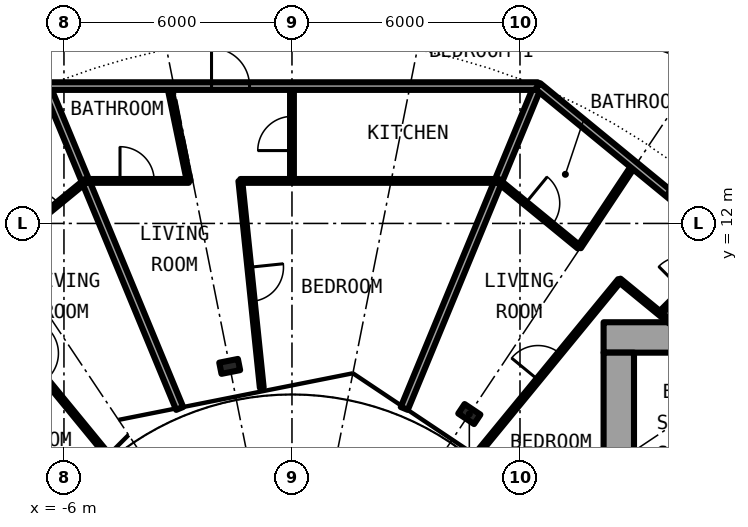
"""IFC4 building model, lengths in metres.
Left out: names, types, materials, properties, quantities, classifications, styles, units other than length and angle.
Written with IfcOpenShell. Run it as: python <this file> out.ifc"""

import sys

from ifc_helpers import new_model, si_unit, direction, frame, frame_2d, origin, origin_2d, place, context, subcontext, project, spatial, rectangle, i_section, extrude, element, fill, save


model = new_model("IFC4")
c1 = context("Model", 3, precision=1e-05, world=origin(), true_north=direction((0.0, 1.0)))
c2 = subcontext(c1, "Body", "Model", "MODEL_VIEW")
j1 = project(units=[si_unit("LENGTHUNIT", "METRE"), si_unit("PLANEANGLEUNIT", "RADIAN")], contexts=[c1])
p1 = place(None, origin())
s1 = spatial("IfcSite", under=j1, at=p1, CompositionType="ELEMENT")
p2 = place(p1, origin())
s2 = spatial("IfcBuilding", under=s1, at=p2, CompositionType="ELEMENT")
p3 = place(p2, frame((0.0, 0.0, 35.0)))
s3 = spatial("IfcBuildingStorey", under=s2, at=p3, CompositionType="ELEMENT", Elevation=35.0)
for number, where, z_axis, x_axis in (
    (1, (4.667, 6.984, 0.0), (0.0, 0.0, 1.0), (0.556, 0.831, 0.0)),
    (2, (-1.639, 8.239, 0.0), (0.0, 0.0, 1.0), (-0.195, 0.981, 0.0)),
):
    element("IfcColumn", number, at=place(p3, frame(where, z_axis=z_axis, x_axis=x_axis)), inside=s3, PredefinedType="COLUMN", context=c2, shape_type="SweptSolid", body=[
        extrude(i_section(OverallWidth=0.3, OverallDepth=0.5, WebThickness=0.014, FlangeThickness=0.028, FilletRadius=0.027, at=origin_2d()), origin(), (0.0, 0.0, 1.0), 3.05),
    ])
p4 = place(p3, frame((22.4, 9.0, 0.0), z_axis=(0.0, 0.0, 1.0), x_axis=(-1.0, 0.0, 0.0)))
e3 = element("IfcWall", 3, at=p4, inside=s3, PredefinedType="SHEAR", context=c2, shape_type="SweptSolid", body=[
    extrude(rectangle(XDim=14.2, YDim=0.8, at=frame_2d((7.1, 0.0))), origin(), (0.0, 0.0, 1.0), 3.05),
])
p5 = place(p4, frame((1.325, 0.0, 0.0)))
e4 = element("IfcOpeningElement", 4, at=p5, cuts=e3, PredefinedType="OPENING", context=c2, shape_type="SweptSolid", body=[
    extrude(rectangle(XDim=1.2, YDim=2.3, at=frame_2d((0.6, 1.15))), frame((0.0, 0.41, 0.0), z_axis=(0.0, -1.0, 0.0), x_axis=(1.0, 0.0, 0.0)), (0.0, 0.0, 1.0), 0.82),
])
p6 = place(p3, frame((8.6, -8.6, 0.0), z_axis=(0.0, 0.0, 1.0), x_axis=(0.0, 1.0, 0.0)))
e5 = element("IfcWall", 5, at=p6, inside=s3, PredefinedType="SHEAR", context=c2, shape_type="SweptSolid", body=[
    extrude(rectangle(XDim=17.2, YDim=0.8, at=frame_2d((8.6, 0.0))), origin(), (0.0, 0.0, 1.0), 3.05),
])
p7 = place(p6, frame((7.4, 0.0, 0.1)))
e6 = element("IfcOpeningElement", 6, at=p7, cuts=e5, PredefinedType="OPENING", context=c2, shape_type="SweptSolid", body=[
    extrude(rectangle(XDim=2.4, YDim=2.2, at=frame_2d((1.2, 1.1))), frame((0.0, 0.41, 0.0), z_axis=(0.0, -1.0, 0.0), x_axis=(1.0, 0.0, 0.0)), (0.0, 0.0, 1.0), 0.82),
])
p8 = place(p3, frame((-8.621, 10.503, 0.0), z_axis=(0.0, 0.0, 1.0), x_axis=(0.634358693064, -0.773038840249, 0.0)))
e7 = element("IfcWall", 7, at=p8, inside=s3, PredefinedType="PARTITIONING", context=c2, shape_type="SweptSolid", body=[
    extrude(rectangle(XDim=5.868, YDim=0.1, at=frame_2d((2.934, 0.0))), origin(), (0.0, 0.0, 1.0), 2.7),
])
p9 = place(p8, frame((2.484, 0.0, 0.0)))
e8 = element("IfcOpeningElement", 8, at=p9, cuts=e7, PredefinedType="OPENING", context=c2, shape_type="SweptSolid", body=[
    extrude(rectangle(XDim=0.9, YDim=2.3, at=frame_2d((0.45, 1.15))), frame((0.0, 0.06, 0.0), z_axis=(0.0, -1.0, 0.0), x_axis=(1.0, 0.0, 0.0)), (0.0, 0.0, 1.0), 0.12),
])
p10 = place(p3, frame((-6.467, 15.614, 0.0), z_axis=(0.0, 0.0, 1.0), x_axis=(0.382556139466, -0.923932248683, 0.0)))
e9 = element("IfcWall", 9, at=p10, inside=s3, PredefinedType="PARTITIONING", context=c2, shape_type="SweptSolid", body=[
    extrude(rectangle(XDim=9.18, YDim=0.2, at=frame_2d((4.59, 0.0))), origin(), (0.0, 0.0, 1.0), 2.7),
])
p11 = place(p3, frame((-3.234, 15.614, 0.0), z_axis=(0.0, 0.0, 1.0), x_axis=(0.202836883315, -0.97921254014, 0.0)))
e10 = element("IfcWall", 10, at=p11, inside=s3, PredefinedType="PARTITIONING", context=c2, shape_type="SweptSolid", body=[
    extrude(rectangle(XDim=2.548, YDim=0.1, at=frame_2d((1.274, 0.0))), origin(), (0.0, 0.0, 1.0), 2.7),
])
p12 = place(p3, frame((-1.359, 13.119, 0.0), z_axis=(0.0, 0.0, 1.0), x_axis=(0.103118462411, -0.994669082012, 0.0)))
e11 = element("IfcWall", 11, at=p12, inside=s3, PredefinedType="PARTITIONING", context=c2, shape_type="SweptSolid", body=[
    extrude(rectangle(XDim=5.469, YDim=0.1, at=frame_2d((2.734, 0.0))), origin(), (0.0, 0.0, 1.0), 2.7),
])
p13 = place(p12, frame((2.285, 0.0, 0.0)))
e12 = element("IfcOpeningElement", 12, at=p13, cuts=e11, PredefinedType="OPENING", context=c2, shape_type="SweptSolid", body=[
    extrude(rectangle(XDim=0.9, YDim=2.3, at=frame_2d((0.45, 1.15))), frame((0.0, 0.06, 0.0), z_axis=(0.0, -1.0, 0.0), x_axis=(1.0, 0.0, 0.0)), (0.0, 0.0, 1.0), 0.12),
])
p14 = place(p3, frame((0.0, 13.119, 0.0), z_axis=(0.0, 0.0, 1.0), x_axis=(0.0, 1.0, 0.0)))
e13 = element("IfcWall", 13, at=p14, inside=s3, PredefinedType="PARTITIONING", context=c2, shape_type="SweptSolid", body=[
    extrude(rectangle(XDim=2.495, YDim=0.1, at=frame_2d((1.248, 0.0))), origin(), (0.0, 0.0, 1.0), 2.7),
])
p15 = place(p14, frame((0.798, 0.0, 0.0)))
e14 = element("IfcOpeningElement", 14, at=p15, cuts=e13, PredefinedType="OPENING", context=c2, shape_type="SweptSolid", body=[
    extrude(rectangle(XDim=0.9, YDim=2.3, at=frame_2d((0.45, 1.15))), frame((0.0, 0.06, 0.0), z_axis=(0.0, -1.0, 0.0), x_axis=(1.0, 0.0, 0.0)), (0.0, 0.0, 1.0), 0.12),
])
p16 = place(p3, frame((2.955, 7.132, 0.0), z_axis=(0.0, 0.0, 1.0), x_axis=(0.382556139466, 0.923932248683, 0.0)))
e15 = element("IfcWall", 15, at=p16, inside=s3, PredefinedType="PARTITIONING", context=c2, shape_type="SweptSolid", body=[
    extrude(rectangle(XDim=9.18, YDim=0.2, at=frame_2d((4.59, 0.0))), origin(), (0.0, 0.0, 1.0), 2.7),
])
p17 = place(p3, frame((4.899, 5.967, 0.0), z_axis=(0.0, 0.0, 1.0), x_axis=(0.634358693064, 0.773038840249, 0.0)))
e16 = element("IfcWall", 16, at=p17, inside=s3, PredefinedType="PARTITIONING", context=c2, shape_type="SweptSolid", body=[
    extrude(rectangle(XDim=5.868, YDim=0.1, at=frame_2d((2.934, 0.0))), origin(), (0.0, 0.0, 1.0), 2.7),
])
p18 = place(p17, frame((2.484, 0.0, 0.0)))
e17 = element("IfcOpeningElement", 17, at=p18, cuts=e16, PredefinedType="OPENING", context=c2, shape_type="SweptSolid", body=[
    extrude(rectangle(XDim=0.9, YDim=2.3, at=frame_2d((0.45, 1.15))), frame((0.0, 0.06, 0.0), z_axis=(0.0, -1.0, 0.0), x_axis=(1.0, 0.0, 0.0)), (0.0, 0.0, 1.0), 0.12),
])
p19 = place(p3, frame((7.56, 11.375, 0.0), z_axis=(0.0, 0.0, 1.0), x_axis=(0.553354377247, 0.83294593653, 0.0)))
e18 = element("IfcWall", 18, at=p19, inside=s3, PredefinedType="PARTITIONING", context=c2, shape_type="SweptSolid", body=[
    extrude(rectangle(XDim=2.597, YDim=0.1, at=frame_2d((1.298, 0.0))), origin(), (0.0, 0.0, 1.0), 2.7),
])
p20 = place(p3, frame((9.683, 9.632, 0.0), z_axis=(0.0, 0.0, 1.0), x_axis=(0.708796844581, 0.705412668665, 0.0)))
e19 = element("IfcWall", 19, at=p20, inside=s3, PredefinedType="PARTITIONING", context=c2, shape_type="SweptSolid", body=[
    extrude(rectangle(XDim=2.597, YDim=0.1, at=frame_2d((1.299, 0.0))), origin(), (0.0, 0.0, 1.0), 2.7),
])
p21 = place(p20, frame((0.849, 0.0, 0.0)))
e20 = element("IfcOpeningElement", 20, at=p21, cuts=e19, PredefinedType="OPENING", context=c2, shape_type="SweptSolid", body=[
    extrude(rectangle(XDim=0.9, YDim=2.3, at=frame_2d((0.45, 1.15))), frame((0.0, 0.06, 0.0), z_axis=(0.0, -1.0, 0.0), x_axis=(1.0, 0.0, 0.0)), (0.0, 0.0, 1.0), 0.12),
])
p22 = place(p3, frame((-5.434, 13.119, 0.0), z_axis=(0.0, 0.0, 1.0), x_axis=(1.0, 0.0, 0.0)))
e21 = element("IfcWall", 21, at=p22, inside=s3, PredefinedType="PARTITIONING", context=c2, shape_type="SweptSolid", body=[
    extrude(rectangle(XDim=2.717, YDim=0.1, at=frame_2d((1.358, 0.0))), origin(), (0.0, 0.0, 1.0), 2.7),
])
p23 = place(p22, frame((0.909, 0.0, 0.0)))
e22 = element("IfcOpeningElement", 22, at=p23, cuts=e21, PredefinedType="OPENING", context=c2, shape_type="SweptSolid", body=[
    extrude(rectangle(XDim=0.9, YDim=2.3, at=frame_2d((0.45, 1.15))), frame((0.0, 0.06, 0.0), z_axis=(0.0, -1.0, 0.0), x_axis=(1.0, 0.0, 0.0)), (0.0, 0.0, 1.0), 0.12),
])
p24 = place(p3, frame((-1.359, 13.119, 0.0), z_axis=(0.0, 0.0, 1.0), x_axis=(1.0, 0.0, 0.0)))
e23 = element("IfcWall", 23, at=p24, inside=s3, PredefinedType="PARTITIONING", context=c2, shape_type="SweptSolid", body=[
    extrude(rectangle(XDim=6.793, YDim=0.1, at=frame_2d((3.396, 0.0))), origin(), (0.0, 0.0, 1.0), 2.7),
])
p25 = place(p3, frame((-7.552, 11.379, 0.0), z_axis=(0.0, 0.0, 1.0), x_axis=(0.773323547924, 0.634011585246, 0.0)))
e24 = element("IfcWall", 24, at=p25, inside=s3, PredefinedType="PARTITIONING", context=c2, shape_type="SweptSolid", body=[
    extrude(rectangle(XDim=2.748, YDim=0.1, at=frame_2d((1.374, 0.0))), origin(), (0.0, 0.0, 1.0), 2.7),
])
p26 = place(p25, frame((0.917, 0.0, 0.0)))
e25 = element("IfcOpeningElement", 25, at=p26, cuts=e24, PredefinedType="OPENING", context=c2, shape_type="SweptSolid", body=[
    extrude(rectangle(XDim=0.9, YDim=2.3, at=frame_2d((0.45, 1.15))), frame((0.0, 0.06, 0.0), z_axis=(0.0, -1.0, 0.0), x_axis=(1.0, 0.0, 0.0)), (0.0, 0.0, 1.0), 0.12),
])
p27 = place(p3, frame((5.427, 13.121, 0.0), z_axis=(0.0, 0.0, 1.0), x_axis=(0.773323547924, -0.634011585246, 0.0)))
e26 = element("IfcWall", 26, at=p27, inside=s3, PredefinedType="PARTITIONING", context=c2, shape_type="SweptSolid", body=[
    extrude(rectangle(XDim=2.748, YDim=0.1, at=frame_2d((1.374, 0.0))), origin(), (0.0, 0.0, 1.0), 2.7),
])
p28 = place(p27, frame((0.93, 0.0, 0.0)))
e27 = element("IfcOpeningElement", 27, at=p28, cuts=e26, PredefinedType="OPENING", context=c2, shape_type="SweptSolid", body=[
    extrude(rectangle(XDim=0.9, YDim=2.3, at=frame_2d((0.45, 1.15))), frame((0.0, 0.06, 0.0), z_axis=(0.0, -1.0, 0.0), x_axis=(1.0, 0.0, 0.0)), (0.0, 0.0, 1.0), 0.12),
])
p29 = place(p3, frame((8.613, 10.509, 0.0), z_axis=(0.0, 0.0, 1.0), x_axis=(0.773141825369, -0.634233173104, 0.0)))
e28 = element("IfcWall", 28, at=p29, inside=s3, PredefinedType="PARTITIONING", context=c2, shape_type="SweptSolid", body=[
    extrude(rectangle(XDim=1.749, YDim=0.1, at=frame_2d((0.875, 0.0))), origin(), (0.0, 0.0, 1.0), 2.7),
])
p30 = place(p3, frame((-6.467, 15.614, 0.0), z_axis=(0.0, 0.0, 1.0), x_axis=(1.0, 0.0, 0.0)))
e29 = element("IfcWall", 29, at=p30, inside=s3, PredefinedType="PARTITIONING", context=c2, shape_type="SweptSolid", body=[
    extrude(rectangle(XDim=12.934, YDim=0.2, at=frame_2d((6.467, 0.0))), origin(), (0.0, 0.0, 1.0), 2.7),
])
p31 = place(p30, frame((4.35, 0.0, 0.0)))
e30 = element("IfcOpeningElement", 30, at=p31, cuts=e29, PredefinedType="OPENING", context=c2, shape_type="SweptSolid", body=[
    extrude(rectangle(XDim=1.0, YDim=2.3, at=frame_2d((0.5, 1.15))), frame((0.0, 0.11, 0.0), z_axis=(0.0, -1.0, 0.0), x_axis=(1.0, 0.0, 0.0)), (0.0, 0.0, 1.0), 0.22),
])
p32 = place(p3, frame((6.469, 15.613, 0.0), z_axis=(0.0, 0.0, 1.0), x_axis=(0.77298340166, -0.634426245326, 0.0)))
e31 = element("IfcWall", 31, at=p32, inside=s3, PredefinedType="PARTITIONING", context=c2, shape_type="SweptSolid", body=[
    extrude(rectangle(XDim=9.793, YDim=0.2, at=frame_2d((4.896, 0.0))), origin(), (0.0, 0.0, 1.0), 2.7),
])
p33 = place(p32, frame((4.404, 0.0, 0.0)))
e32 = element("IfcOpeningElement", 32, at=p33, cuts=e31, PredefinedType="OPENING", context=c2, shape_type="SweptSolid", body=[
    extrude(rectangle(XDim=1.0, YDim=2.3, at=frame_2d((0.5, 1.15))), frame((0.0, 0.11, 0.0), z_axis=(0.0, -1.0, 0.0), x_axis=(1.0, 0.0, 0.0)), (0.0, 0.0, 1.0), 0.22),
])
p34 = place(p3, frame((1.918, 19.506, 0.0), z_axis=(0.0, 0.0, 1.0), x_axis=(0.941574977747, -0.336803446065, 0.0)))
e33 = element("IfcWall", 33, at=p34, inside=s3, PredefinedType="PARTITIONING", context=c2, shape_type="SweptSolid", body=[
    extrude(rectangle(XDim=9.37, YDim=0.2, at=frame_2d((4.685, 0.0))), origin(), (0.0, 0.0, 1.0), 2.38),
])
p35 = place(p34, frame((3.313, 0.0, 0.0)))
e34 = element("IfcOpeningElement", 34, at=p35, cuts=e33, PredefinedType="OPENING", context=c2, shape_type="SweptSolid", body=[
    extrude(rectangle(XDim=1.0, YDim=2.3, at=frame_2d((0.5, 1.15))), frame((0.0, 0.11, 0.0), z_axis=(0.0, -1.0, 0.0), x_axis=(1.0, 0.0, 0.0)), (0.0, 0.0, 1.0), 0.22),
])
p36 = place(p33, origin())
e35 = element("IfcDoor", 35, at=p36, inside=s3, OperationType="SINGLE_SWING_RIGHT", PredefinedType="DOOR", context=c2, shape_type="SweptSolid", body=[
    extrude(rectangle(XDim=1.0, YDim=2.3, at=frame_2d((0.5, 1.15))), frame((0.0, 0.025, 0.0), z_axis=(0.0, -1.0, 0.0), x_axis=(1.0, 0.0, 0.0)), (0.0, 0.0, 1.0), 0.05),
])
fill(e32, e35)
p37 = place(p28, origin())
e36 = element("IfcDoor", 36, at=p37, inside=s3, OperationType="SINGLE_SWING_RIGHT", PredefinedType="DOOR", context=c2, shape_type="SweptSolid", body=[
    extrude(rectangle(XDim=0.9, YDim=2.3, at=frame_2d((0.45, 1.15))), frame((0.0, 0.025, 0.0), z_axis=(0.0, -1.0, 0.0), x_axis=(1.0, 0.0, 0.0)), (0.0, 0.0, 1.0), 0.05),
])
fill(e27, e36)
p38 = place(p18, origin())
e37 = element("IfcDoor", 37, at=p38, inside=s3, OperationType="SINGLE_SWING_RIGHT", PredefinedType="DOOR", context=c2, shape_type="SweptSolid", body=[
    extrude(rectangle(XDim=0.9, YDim=2.3, at=frame_2d((0.45, 1.15))), frame((0.0, 0.025, 0.0), z_axis=(0.0, -1.0, 0.0), x_axis=(1.0, 0.0, 0.0)), (0.0, 0.0, 1.0), 0.05),
])
fill(e17, e37)
p39 = place(p31, origin())
e38 = element("IfcDoor", 38, at=p39, inside=s3, OperationType="SINGLE_SWING_LEFT", PredefinedType="DOOR", context=c2, shape_type="SweptSolid", body=[
    extrude(rectangle(XDim=1.0, YDim=2.3, at=frame_2d((0.5, 1.15))), frame((0.0, 0.025, 0.0), z_axis=(0.0, -1.0, 0.0), x_axis=(1.0, 0.0, 0.0)), (0.0, 0.0, 1.0), 0.05),
])
fill(e30, e38)
p40 = place(p23, origin())
e39 = element("IfcDoor", 39, at=p40, inside=s3, OperationType="SINGLE_SWING_RIGHT", PredefinedType="DOOR", context=c2, shape_type="SweptSolid", body=[
    extrude(rectangle(XDim=0.9, YDim=2.3, at=frame_2d((0.45, 1.15))), frame((0.0, 0.025, 0.0), z_axis=(0.0, -1.0, 0.0), x_axis=(1.0, 0.0, 0.0)), (0.0, 0.0, 1.0), 0.05),
])
fill(e22, e39)
p41 = place(p15, origin())
e40 = element("IfcDoor", 40, at=p41, inside=s3, OperationType="SINGLE_SWING_RIGHT", PredefinedType="DOOR", context=c2, shape_type="SweptSolid", body=[
    extrude(rectangle(XDim=0.9, YDim=2.3, at=frame_2d((0.45, 1.15))), frame((0.0, 0.025, 0.0), z_axis=(0.0, -1.0, 0.0), x_axis=(1.0, 0.0, 0.0)), (0.0, 0.0, 1.0), 0.05),
])
fill(e14, e40)
p42 = place(p13, origin())
e41 = element("IfcDoor", 41, at=p42, inside=s3, OperationType="SINGLE_SWING_RIGHT", PredefinedType="DOOR", context=c2, shape_type="SweptSolid", body=[
    extrude(rectangle(XDim=0.9, YDim=2.3, at=frame_2d((0.45, 1.15))), frame((0.0, 0.025, 0.0), z_axis=(0.0, -1.0, 0.0), x_axis=(1.0, 0.0, 0.0)), (0.0, 0.0, 1.0), 0.05),
])
fill(e12, e41)
p43 = place(p26, origin())
e42 = element("IfcDoor", 42, at=p43, inside=s3, OperationType="SINGLE_SWING_LEFT", PredefinedType="DOOR", context=c2, shape_type="SweptSolid", body=[
    extrude(rectangle(XDim=0.9, YDim=2.3, at=frame_2d((0.45, 1.15))), frame((0.0, 0.025, 0.0), z_axis=(0.0, -1.0, 0.0), x_axis=(1.0, 0.0, 0.0)), (0.0, 0.0, 1.0), 0.05),
])
fill(e25, e42)
save(model, sys.argv[1])
